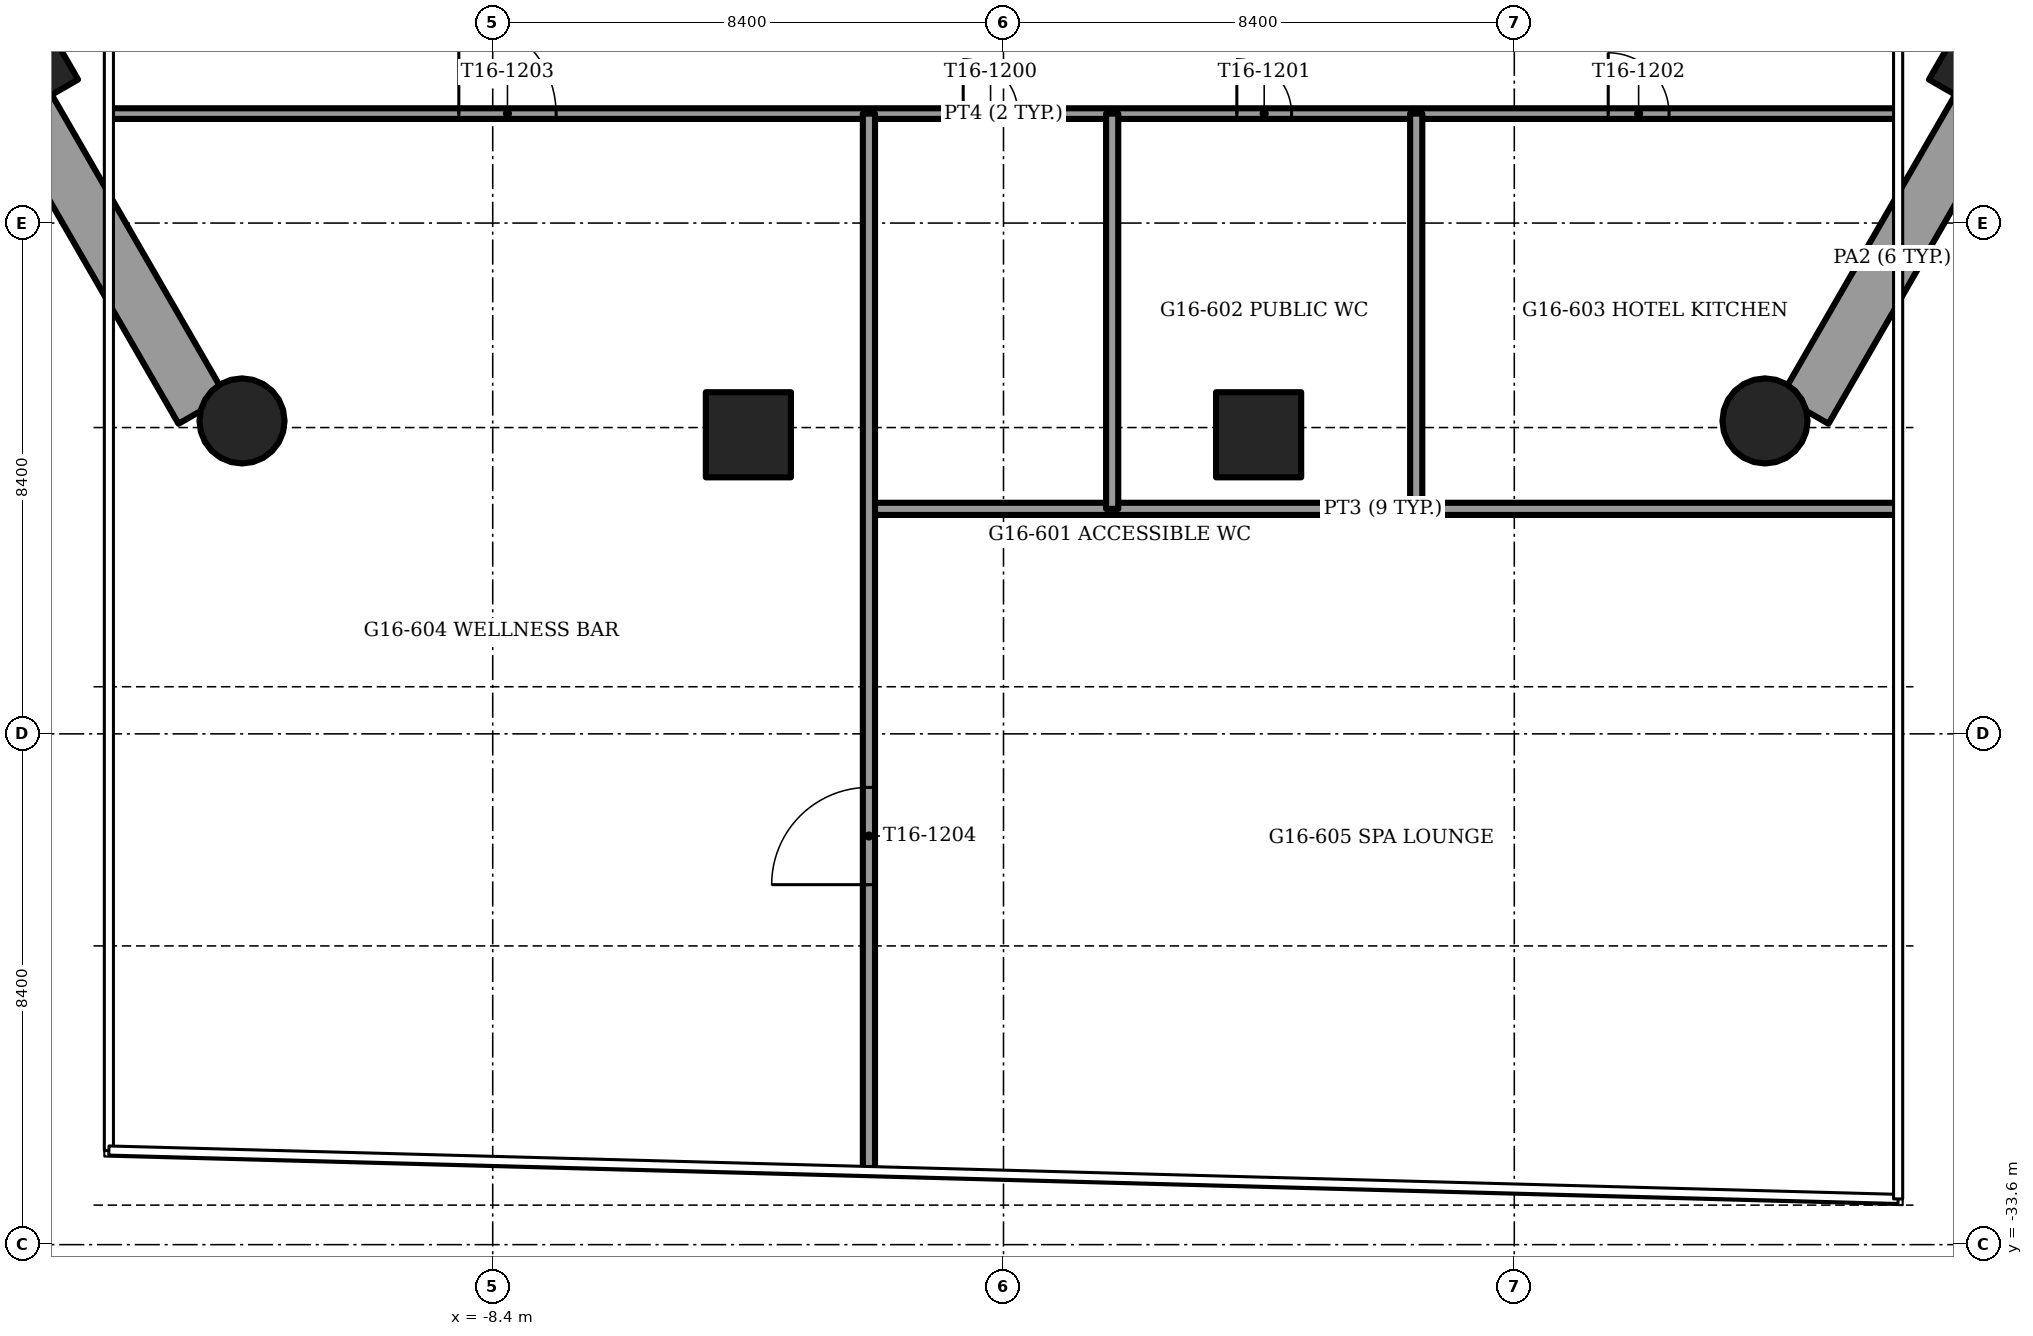
"""IFC4 building model, lengths in metres.
Left out: names, types, materials, properties, quantities, classifications, styles, units other than length and angle.
Written with IfcOpenShell. Run it as: python <this file> out.ifc"""

import sys

from ifc_helpers import new_model, si_unit, direction, frame, frame_2d, origin, origin_2d, place, context, subcontext, project, spatial, rectangle, circle, extrude, element, fill, save


model = new_model("IFC4")
c1 = context("Model", 3, precision=1e-05, world=origin(), true_north=direction((0.0, 1.0)))
c2 = subcontext(c1, "Body", "Model", "MODEL_VIEW")
j1 = project(units=[si_unit("LENGTHUNIT", "METRE"), si_unit("PLANEANGLEUNIT", "RADIAN")], contexts=[c1])
p1 = place(None, origin())
s1 = spatial("IfcSite", under=j1, at=p1, CompositionType="ELEMENT")
p2 = place(p1, origin())
s2 = spatial("IfcBuilding", under=s1, at=p2, CompositionType="ELEMENT")
p3 = place(p2, frame((0.0, 0.0, 65.5)))
s3 = spatial("IfcBuildingStorey", under=s2, at=p3, CompositionType="ELEMENT", Elevation=65.5)
for number, where, z_axis, x_axis in (
    (1, (-12.523, -20.054, -1.2), (0.0, 0.0, 1.0), (1.0, 0.0, 0.0)),
    (2, (12.523, -20.054, -1.2), (0.0, 0.0, 1.0), (1.0, 0.0, 0.0)),
):
    element("IfcColumn", number, at=place(p3, frame(where, z_axis=z_axis, x_axis=x_axis)), inside=s3, PredefinedType="COLUMN", context=c2, shape_type="SweptSolid", body=[
        extrude(circle(Radius=0.7, at=origin_2d()), origin(), (0.0, 0.0, 1.0), 3.75),
    ])
for number, where, z_axis, x_axis in (
    (3, (-16.175, -14.183, -1.2), (0.0, 0.0, 1.0), (-0.5, 0.866, 0.0)),
    (4, (-4.195, -20.282, -1.2), (0.0, 0.0, 1.0), (-1.0, 0.0, 0.0)),
    (5, (4.195, -20.282, -1.2), (0.0, 0.0, 1.0), (-1.0, 0.0, 0.0)),
    (6, (16.175, -14.183, -1.2), (0.0, 0.0, 1.0), (-0.5, -0.866, 0.0)),
):
    element("IfcColumn", number, at=place(p3, frame(where, z_axis=z_axis, x_axis=x_axis)), inside=s3, PredefinedType="COLUMN", context=c2, shape_type="SweptSolid", body=[
        extrude(rectangle(XDim=1.4, YDim=1.4, at=origin_2d()), origin(), (0.0, 0.0, 1.0), 3.75),
    ])
for number, where, z_axis, x_axis in (
    (7, (-16.057, -14.889, 0.0), (0.0, 0.0, 1.0), (0.5, -0.866, 0.0)),
    (8, (13.177, -19.876, 0.0), (0.0, 0.0, 1.0), (0.5, 0.866, 0.0)),
):
    element("IfcWall", number, at=place(p3, frame(where, z_axis=z_axis, x_axis=x_axis)), inside=s3, PredefinedType="PARAPET", context=c2, shape_type="SweptSolid", body=[
        extrude(rectangle(XDim=5.759, YDim=0.9, at=frame_2d((2.879, 0.0))), origin(), (0.0, 0.0, 1.0), 1.1),
    ])
p4 = place(p3, frame((-14.693, -15.0, 0.0), z_axis=(0.0, 0.0, 1.0), x_axis=(1.0, 0.0, 0.0)))
e9 = element("IfcWall", 9, at=p4, inside=s3, PredefinedType="PARTITIONING", context=c2, shape_type="SweptSolid", body=[
    extrude(rectangle(XDim=29.386, YDim=0.175, at=frame_2d((14.693, 0.0))), origin(), (0.0, 0.0, 1.0), 3.45),
])
p5 = place(p4, frame((14.031, 0.0, 0.0)))
e10 = element("IfcOpeningElement", 10, at=p5, cuts=e9, PredefinedType="OPENING", context=c2, shape_type="SweptSolid", body=[
    extrude(rectangle(XDim=0.9, YDim=2.1, at=frame_2d((0.45, 1.05))), frame((0.0, 0.087, 0.0), z_axis=(0.0, -1.0, 0.0), x_axis=(1.0, 0.0, 0.0)), (0.0, 0.0, 1.0), 0.175),
])
p6 = place(p4, frame((18.531, 0.0, 0.0)))
e11 = element("IfcOpeningElement", 11, at=p6, cuts=e9, PredefinedType="OPENING", context=c2, shape_type="SweptSolid", body=[
    extrude(rectangle(XDim=0.9, YDim=2.1, at=frame_2d((0.45, 1.05))), frame((0.0, 0.087, 0.0), z_axis=(0.0, -1.0, 0.0), x_axis=(1.0, 0.0, 0.0)), (0.0, 0.0, 1.0), 0.175),
])
p7 = place(p4, frame((24.638, 0.0, 0.0)))
e12 = element("IfcOpeningElement", 12, at=p7, cuts=e9, PredefinedType="OPENING", context=c2, shape_type="SweptSolid", body=[
    extrude(rectangle(XDim=1.0, YDim=2.1, at=frame_2d((0.5, 1.05))), frame((0.0, 0.087, 0.0), z_axis=(0.0, -1.0, 0.0), x_axis=(1.0, 0.0, 0.0)), (0.0, 0.0, 1.0), 0.175),
])
p8 = place(p4, frame((5.736, 0.0, 0.0)))
e13 = element("IfcOpeningElement", 13, at=p8, cuts=e9, PredefinedType="OPENING", context=c2, shape_type="SweptSolid", body=[
    extrude(rectangle(XDim=1.6, YDim=2.1, at=frame_2d((0.8, 1.05))), frame((0.0, 0.087, 0.0), z_axis=(0.0, -1.0, 0.0), x_axis=(1.0, 0.0, 0.0)), (0.0, 0.0, 1.0), 0.175),
])
p9 = place(p3, frame((-2.213, -21.5, 0.0), z_axis=(0.0, 0.0, 1.0), x_axis=(1.0, 0.0, 0.0)))
e14 = element("IfcWall", 14, at=p9, inside=s3, PredefinedType="PARTITIONING", context=c2, shape_type="SweptSolid", body=[
    extrude(rectangle(XDim=16.906, YDim=0.2, at=frame_2d((8.453, 0.0))), origin(), (0.0, 0.0, 1.0), 3.45),
])
p10 = place(p3, frame((-2.213, -32.371, 0.0), z_axis=(0.0, 0.0, 1.0), x_axis=(0.0, 1.0, 0.0)))
e15 = element("IfcWall", 15, at=p10, inside=s3, PredefinedType="PARTITIONING", context=c2, shape_type="SweptSolid", body=[
    extrude(rectangle(XDim=17.371, YDim=0.2, at=frame_2d((8.686, 0.0))), origin(), (0.0, 0.0, 1.0), 2.828),
])
p11 = place(p10, frame((4.691, 0.0, 0.0)))
e16 = element("IfcOpeningElement", 16, at=p11, cuts=e15, PredefinedType="OPENING", context=c2, shape_type="SweptSolid", body=[
    extrude(rectangle(XDim=1.6, YDim=2.1, at=frame_2d((0.8, 1.05))), frame((0.0, 0.1, 0.0), z_axis=(0.0, -1.0, 0.0), x_axis=(1.0, 0.0, 0.0)), (0.0, 0.0, 1.0), 0.2),
])
for number, where, z_axis, x_axis in (
    (17, (1.787, -21.5, 0.0), (0.0, 0.0, 1.0), (0.0, 1.0, 0.0)),
    (18, (6.787, -21.5, 0.0), (0.0, 0.0, 1.0), (0.0, 1.0, 0.0)),
):
    element("IfcWall", number, at=place(p3, frame(where, z_axis=z_axis, x_axis=x_axis)), inside=s3, PredefinedType="PARTITIONING", context=c2, shape_type="SweptSolid", body=[
        extrude(rectangle(XDim=6.5, YDim=0.2, at=frame_2d((3.25, 0.0))), origin(), (0.0, 0.0, 1.0), 2.828),
    ])
p12 = place(p5, origin())
e19 = element("IfcDoor", 19, at=p12, inside=s3, OperationType="SINGLE_SWING_RIGHT", PredefinedType="DOOR", context=c2, shape_type="SweptSolid", body=[
    extrude(rectangle(XDim=0.9, YDim=2.1, at=frame_2d((0.45, 1.05))), frame((0.0, 0.025, 0.0), z_axis=(0.0, -1.0, 0.0), x_axis=(1.0, 0.0, 0.0)), (0.0, 0.0, 1.0), 0.05),
])
fill(e10, e19)
p13 = place(p6, origin())
e20 = element("IfcDoor", 20, at=p13, inside=s3, OperationType="SINGLE_SWING_LEFT", PredefinedType="DOOR", context=c2, shape_type="SweptSolid", body=[
    extrude(rectangle(XDim=0.9, YDim=2.1, at=frame_2d((0.45, 1.05))), frame((0.0, 0.025, 0.0), z_axis=(0.0, -1.0, 0.0), x_axis=(1.0, 0.0, 0.0)), (0.0, 0.0, 1.0), 0.05),
])
fill(e11, e20)
p14 = place(p7, origin())
e21 = element("IfcDoor", 21, at=p14, inside=s3, OperationType="SINGLE_SWING_RIGHT", PredefinedType="DOOR", context=c2, shape_type="SweptSolid", body=[
    extrude(rectangle(XDim=1.0, YDim=2.1, at=frame_2d((0.5, 1.05))), frame((0.0, 0.025, 0.0), z_axis=(0.0, -1.0, 0.0), x_axis=(1.0, 0.0, 0.0)), (0.0, 0.0, 1.0), 0.05),
])
fill(e12, e21)
p15 = place(p8, origin())
e22 = element("IfcDoor", 22, at=p15, inside=s3, OperationType="DOUBLE_DOOR_SINGLE_SWING", PredefinedType="DOOR", context=c2, shape_type="SweptSolid", body=[
    extrude(rectangle(XDim=1.6, YDim=2.1, at=frame_2d((0.8, 1.05))), frame((0.0, 0.025, 0.0), z_axis=(0.0, -1.0, 0.0), x_axis=(1.0, 0.0, 0.0)), (0.0, 0.0, 1.0), 0.05),
])
fill(e13, e22)
p16 = place(p11, origin())
e23 = element("IfcDoor", 23, at=p16, inside=s3, OperationType="DOUBLE_DOOR_SINGLE_SWING", PredefinedType="DOOR", context=c2, shape_type="SweptSolid", body=[
    extrude(rectangle(XDim=1.6, YDim=2.1, at=frame_2d((0.8, 1.05))), frame((0.0, 0.025, 0.0), z_axis=(0.0, -1.0, 0.0), x_axis=(1.0, 0.0, 0.0)), (0.0, 0.0, 1.0), 0.05),
])
fill(e16, e23)
save(model, sys.argv[1])
